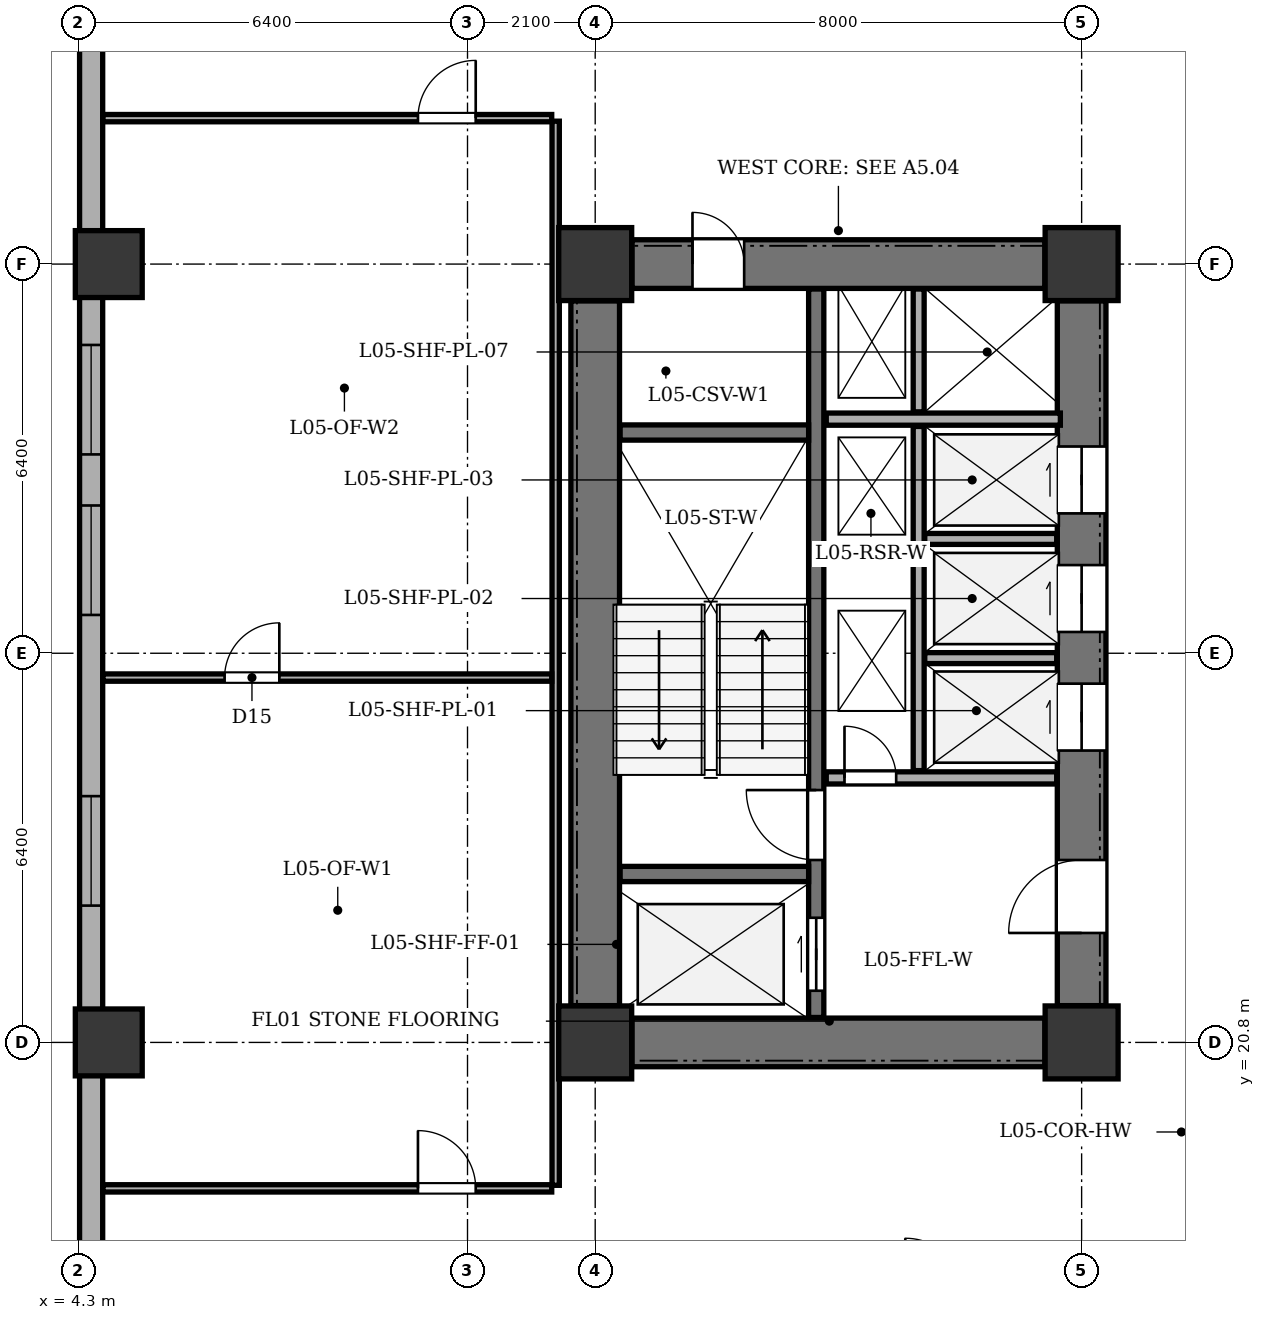
"""IFC4 building model, lengths in metres.
Left out: names, types, materials, properties, quantities, classifications, styles, units other than length and angle.
Written with IfcOpenShell. Run it as: python <this file> out.ifc"""

import sys

from ifc_helpers import new_model, si_unit, direction, frame, frame_2d, origin, origin_2d, place, context, subcontext, project, spatial, rectangle, extrude, element, fill, save


model = new_model("IFC4")
c1 = context("Model", 3, precision=1e-05, world=origin(), true_north=direction((0.0, 1.0)))
c2 = subcontext(c1, "Body", "Model", "MODEL_VIEW")
j1 = project(units=[si_unit("LENGTHUNIT", "METRE"), si_unit("PLANEANGLEUNIT", "RADIAN")], contexts=[c1])
p1 = place(None, origin())
s1 = spatial("IfcSite", under=j1, at=p1, CompositionType="ELEMENT")
p2 = place(p1, origin())
s2 = spatial("IfcBuilding", under=s1, at=p2, CompositionType="ELEMENT")
p3 = place(p2, frame((0.0, 0.0, 24.3)))
s3 = spatial("IfcBuildingStorey", under=s2, at=p3, CompositionType="ELEMENT", Elevation=24.3)
for number, where, z_axis, x_axis in (
    (1, (12.8, 20.8, 0.0), (0.0, 0.0, 1.0), (1.0, 0.0, 0.0)),
    (2, (20.8, 20.8, 0.0), (0.0, 0.0, 1.0), (1.0, 0.0, 0.0)),
    (3, (12.8, 33.6, 0.0), (0.0, 0.0, 1.0), (1.0, 0.0, 0.0)),
    (4, (20.8, 33.6, 0.0), (0.0, 0.0, 1.0), (1.0, 0.0, 0.0)),
):
    element("IfcColumn", number, at=place(p3, frame(where, z_axis=z_axis, x_axis=x_axis)), inside=s3, PredefinedType="COLUMN", context=c2, shape_type="SweptSolid", body=[
        extrude(rectangle(XDim=1.2, YDim=1.2, at=origin_2d()), origin(), (0.0, 0.0, 1.0), 3.9),
    ])
for number, where, z_axis, x_axis in (
    (5, (4.8, 20.8, 0.0), (0.0, 0.0, 1.0), (1.0, 0.0, 0.0)),
    (6, (4.8, 33.6, 0.0), (0.0, 0.0, 1.0), (1.0, 0.0, 0.0)),
):
    element("IfcColumn", number, at=place(p3, frame(where, z_axis=z_axis, x_axis=x_axis)), inside=s3, PredefinedType="COLUMN", context=c2, shape_type="SweptSolid", body=[
        extrude(rectangle(XDim=1.1, YDim=1.1, at=origin_2d()), origin(), (0.0, 0.0, 1.0), 3.9),
    ])
p4 = place(p3, frame((4.51, 6.5, 0.0), z_axis=(0.0, 0.0, 1.0), x_axis=(0.0, 1.0, 0.0)))
e7 = element("IfcWall", 7, at=p4, inside=s3, PredefinedType="STANDARD", context=c2, shape_type="SweptSolid", body=[
    extrude(rectangle(XDim=35.0, YDim=0.38, at=frame_2d((17.5, 0.0))), origin(), (0.0, 0.0, 1.0), 3.135),
])
p5 = place(p4, frame((2.693, 0.0, 0.8)))
e8 = element("IfcOpeningElement", 8, at=p5, cuts=e7, PredefinedType="OPENING", context=c2, shape_type="SweptSolid", body=[
    extrude(rectangle(XDim=1.8, YDim=1.9, at=frame_2d((0.9, 0.95))), frame((0.0, 0.2, 0.0), z_axis=(0.0, -1.0, 0.0), x_axis=(1.0, 0.0, 0.0)), (0.0, 0.0, 1.0), 0.4),
])
p6 = place(p4, frame((7.457, 0.0, 0.8)))
e9 = element("IfcOpeningElement", 9, at=p6, cuts=e7, PredefinedType="OPENING", context=c2, shape_type="SweptSolid", body=[
    extrude(rectangle(XDim=2.4, YDim=1.9, at=frame_2d((1.2, 0.95))), frame((0.0, 0.2, 0.0), z_axis=(0.0, -1.0, 0.0), x_axis=(1.0, 0.0, 0.0)), (0.0, 0.0, 1.0), 0.4),
])
p7 = place(p4, frame((16.55, 0.0, 0.8)))
e10 = element("IfcOpeningElement", 10, at=p7, cuts=e7, PredefinedType="OPENING", context=c2, shape_type="SweptSolid", body=[
    extrude(rectangle(XDim=1.8, YDim=1.9, at=frame_2d((0.9, 0.95))), frame((0.0, 0.2, 0.0), z_axis=(0.0, -1.0, 0.0), x_axis=(1.0, 0.0, 0.0)), (0.0, 0.0, 1.0), 0.4),
])
p8 = place(p4, frame((21.33, 0.0, 0.8)))
e11 = element("IfcOpeningElement", 11, at=p8, cuts=e7, PredefinedType="OPENING", context=c2, shape_type="SweptSolid", body=[
    extrude(rectangle(XDim=1.8, YDim=1.9, at=frame_2d((0.9, 0.95))), frame((0.0, 0.2, 0.0), z_axis=(0.0, -1.0, 0.0), x_axis=(1.0, 0.0, 0.0)), (0.0, 0.0, 1.0), 0.4),
])
p9 = place(p4, frame((23.97, 0.0, 0.8)))
e12 = element("IfcOpeningElement", 12, at=p9, cuts=e7, PredefinedType="OPENING", context=c2, shape_type="SweptSolid", body=[
    extrude(rectangle(XDim=1.8, YDim=1.9, at=frame_2d((0.9, 0.95))), frame((0.0, 0.2, 0.0), z_axis=(0.0, -1.0, 0.0), x_axis=(1.0, 0.0, 0.0)), (0.0, 0.0, 1.0), 0.4),
])
p10 = place(p4, frame((31.175, 0.0, 0.8)))
e13 = element("IfcOpeningElement", 13, at=p10, cuts=e7, PredefinedType="OPENING", context=c2, shape_type="SweptSolid", body=[
    extrude(rectangle(XDim=1.8, YDim=1.9, at=frame_2d((0.9, 0.95))), frame((0.0, 0.2, 0.0), z_axis=(0.0, -1.0, 0.0), x_axis=(1.0, 0.0, 0.0)), (0.0, 0.0, 1.0), 0.4),
])
p11 = place(p3, frame((12.8, 21.405, 0.0), z_axis=(0.0, 0.0, 1.0), x_axis=(0.0, 1.0, 0.0)))
e14 = element("IfcWall", 14, at=p11, inside=s3, PredefinedType="SHEAR", context=c2, shape_type="SweptSolid", body=[
    extrude(rectangle(XDim=11.59, YDim=0.8, at=frame_2d((5.795, 0.0))), origin(), (0.0, 0.0, 1.0), 3.6),
])
p12 = place(p3, frame((13.405, 20.8, 0.0), z_axis=(0.0, 0.0, 1.0), x_axis=(1.0, 0.0, 0.0)))
e15 = element("IfcWall", 15, at=p12, inside=s3, PredefinedType="SHEAR", context=c2, shape_type="SweptSolid", body=[
    extrude(rectangle(XDim=6.79, YDim=0.8, at=frame_2d((3.395, 0.0))), origin(), (0.0, 0.0, 1.0), 3.6),
])
p13 = place(p3, frame((13.405, 33.6, 0.0), z_axis=(0.0, 0.0, 1.0), x_axis=(1.0, 0.0, 0.0)))
e16 = element("IfcWall", 16, at=p13, inside=s3, PredefinedType="SHEAR", context=c2, shape_type="SweptSolid", body=[
    extrude(rectangle(XDim=6.79, YDim=0.8, at=frame_2d((3.395, 0.0))), origin(), (0.0, 0.0, 1.0), 3.6),
])
p14 = place(p13, frame((0.995, 0.0, 0.0)))
e17 = element("IfcOpeningElement", 17, at=p14, cuts=e16, PredefinedType="OPENING", context=c2, shape_type="SweptSolid", body=[
    extrude(rectangle(XDim=0.85, YDim=2.02, at=frame_2d((0.425, 1.01))), frame((0.0, 0.41, 0.0), z_axis=(0.0, -1.0, 0.0), x_axis=(1.0, 0.0, 0.0)), (0.0, 0.0, 1.0), 0.82),
])
p15 = place(p3, frame((20.8, 21.405, 0.0), z_axis=(0.0, 0.0, 1.0), x_axis=(0.0, 1.0, 0.0)))
e18 = element("IfcWall", 18, at=p15, inside=s3, PredefinedType="SHEAR", context=c2, shape_type="SweptSolid", body=[
    extrude(rectangle(XDim=11.59, YDim=0.8, at=frame_2d((5.795, 0.0))), origin(), (0.0, 0.0, 1.0), 3.6),
])
p16 = place(p15, frame((1.195, 0.0, 0.0)))
e19 = element("IfcOpeningElement", 19, at=p16, cuts=e18, PredefinedType="OPENING", context=c2, shape_type="SweptSolid", body=[
    extrude(rectangle(XDim=1.2, YDim=2.15, at=frame_2d((0.6, 1.075))), frame((0.0, 0.41, 0.0), z_axis=(0.0, -1.0, 0.0), x_axis=(1.0, 0.0, 0.0)), (0.0, 0.0, 1.0), 0.82),
])
p17 = place(p15, frame((4.195, 0.0, 0.0)))
e20 = element("IfcOpeningElement", 20, at=p17, cuts=e18, PredefinedType="OPENING", context=c2, shape_type="SweptSolid", body=[
    extrude(rectangle(XDim=1.1, YDim=2.1, at=frame_2d((0.55, 1.05))), frame((0.0, 0.41, 0.0), z_axis=(0.0, -1.0, 0.0), x_axis=(1.0, 0.0, 0.0)), (0.0, 0.0, 1.0), 0.82),
])
p18 = place(p15, frame((6.145, 0.0, 0.0)))
e21 = element("IfcOpeningElement", 21, at=p18, cuts=e18, PredefinedType="OPENING", context=c2, shape_type="SweptSolid", body=[
    extrude(rectangle(XDim=1.1, YDim=2.1, at=frame_2d((0.55, 1.05))), frame((0.0, 0.41, 0.0), z_axis=(0.0, -1.0, 0.0), x_axis=(1.0, 0.0, 0.0)), (0.0, 0.0, 1.0), 0.82),
])
p19 = place(p15, frame((8.095, 0.0, 0.0)))
e22 = element("IfcOpeningElement", 22, at=p19, cuts=e18, PredefinedType="OPENING", context=c2, shape_type="SweptSolid", body=[
    extrude(rectangle(XDim=1.1, YDim=2.1, at=frame_2d((0.55, 1.05))), frame((0.0, 0.41, 0.0), z_axis=(0.0, -1.0, 0.0), x_axis=(1.0, 0.0, 0.0)), (0.0, 0.0, 1.0), 0.82),
])
p20 = place(p3, frame((16.435, 21.21, 0.0), z_axis=(0.0, 0.0, 1.0), x_axis=(0.0, 1.0, 0.0)))
e23 = element("IfcWall", 23, at=p20, inside=s3, PredefinedType="SHEAR", context=c2, shape_type="SweptSolid", body=[
    extrude(rectangle(XDim=11.98, YDim=0.25, at=frame_2d((5.99, 0.0))), origin(), (0.0, 0.0, 1.0), 3.6),
])
p21 = place(p20, frame((0.44, 0.0, 0.0)))
e24 = element("IfcOpeningElement", 24, at=p21, cuts=e23, PredefinedType="OPENING", context=c2, shape_type="SweptSolid", body=[
    extrude(rectangle(XDim=1.2, YDim=2.15, at=frame_2d((0.6, 1.075))), frame((0.0, 0.135, 0.0), z_axis=(0.0, -1.0, 0.0), x_axis=(1.0, 0.0, 0.0)), (0.0, 0.0, 1.0), 0.27),
])
p22 = place(p20, frame((2.59, 0.0, 0.0)))
e25 = element("IfcOpeningElement", 25, at=p22, cuts=e23, PredefinedType="OPENING", context=c2, shape_type="SweptSolid", body=[
    extrude(rectangle(XDim=1.15, YDim=2.15, at=frame_2d((0.575, 1.075))), frame((0.0, 0.135, 0.0), z_axis=(0.0, -1.0, 0.0), x_axis=(1.0, 0.0, 0.0)), (0.0, 0.0, 1.0), 0.27),
])
for number, where, z_axis, x_axis in (
    (26, (13.21, 23.57, 0.0), (0.0, 0.0, 1.0), (1.0, 0.0, 0.0)),
    (27, (13.21, 30.83, 0.0), (0.0, 0.0, 1.0), (1.0, 0.0, 0.0)),
):
    element("IfcWall", number, at=place(p3, frame(where, z_axis=z_axis, x_axis=x_axis)), inside=s3, PredefinedType="SHEAR", context=c2, shape_type="SweptSolid", body=[
        extrude(rectangle(XDim=3.1, YDim=0.25, at=frame_2d((1.55, 0.0))), origin(), (0.0, 0.0, 1.0), 3.6),
    ])
p23 = place(p3, frame((16.6, 25.15, 0.0), z_axis=(0.0, 0.0, 1.0), x_axis=(1.0, 0.0, 0.0)))
e28 = element("IfcWall", 28, at=p23, inside=s3, PredefinedType="SOLIDWALL", context=c2, shape_type="SweptSolid", body=[
    extrude(rectangle(XDim=3.79, YDim=0.2, at=frame_2d((1.895, 0.0))), origin(), (0.0, 0.0, 1.0), 3.6),
])
p24 = place(p23, frame((0.3, 0.0, 0.0)))
e29 = element("IfcOpeningElement", 29, at=p24, cuts=e28, PredefinedType="OPENING", context=c2, shape_type="SweptSolid", body=[
    extrude(rectangle(XDim=0.85, YDim=2.02, at=frame_2d((0.425, 1.01))), frame((0.0, 0.11, 0.0), z_axis=(0.0, -1.0, 0.0), x_axis=(1.0, 0.0, 0.0)), (0.0, 0.0, 1.0), 0.22),
])
p25 = place(p3, frame((16.6, 31.05, 0.0), z_axis=(0.0, 0.0, 1.0), x_axis=(1.0, 0.0, 0.0)))
e30 = element("IfcWall", 30, at=p25, inside=s3, PredefinedType="SOLIDWALL", context=c2, shape_type="SweptSolid", body=[
    extrude(rectangle(XDim=3.85, YDim=0.2, at=frame_2d((1.925, 0.0))), origin(), (0.0, 0.0, 1.0), 3.6),
])
p26 = place(p3, frame((18.12, 25.27, 0.0), z_axis=(0.0, 0.0, 1.0), x_axis=(0.0, 1.0, 0.0)))
e31 = element("IfcWall", 31, at=p26, inside=s3, PredefinedType="PARTITIONING", context=c2, shape_type="SweptSolid", body=[
    extrude(rectangle(XDim=5.66, YDim=0.18, at=frame_2d((2.83, 0.0))), origin(), (0.0, 0.0, 1.0), 3.6),
])
p27 = place(p3, frame((18.12, 31.17, 0.0), z_axis=(0.0, 0.0, 1.0), x_axis=(0.0, 1.0, 0.0)))
e32 = element("IfcWall", 32, at=p27, inside=s3, PredefinedType="PARTITIONING", context=c2, shape_type="SweptSolid", body=[
    extrude(rectangle(XDim=2.02, YDim=0.18, at=frame_2d((1.01, 0.0))), origin(), (0.0, 0.0, 1.0), 3.6),
])
for number, where, z_axis, x_axis in (
    (33, (18.22, 27.12, 0.0), (0.0, 0.0, 1.0), (1.0, 0.0, 0.0)),
    (34, (18.22, 29.08, 0.0), (0.0, 0.0, 1.0), (1.0, 0.0, 0.0)),
):
    element("IfcWall", number, at=place(p3, frame(where, z_axis=z_axis, x_axis=x_axis)), inside=s3, PredefinedType="PARTITIONING", context=c2, shape_type="SweptSolid", body=[
        extrude(rectangle(XDim=2.17, YDim=0.18, at=frame_2d((1.085, 0.0))), origin(), (0.0, 0.0, 1.0), 3.6),
    ])
p28 = place(p3, frame((12.15, 18.45, 0.0), z_axis=(0.0, 0.0, 1.0), x_axis=(0.0, 1.0, 0.0)))
e35 = element("IfcWall", 35, at=p28, inside=s3, PredefinedType="PARTITIONING", context=c2, shape_type="SweptSolid", body=[
    extrude(rectangle(XDim=17.5, YDim=0.12, at=frame_2d((8.75, 0.0))), origin(), (0.0, 0.0, 1.0), 3.6),
])
p29 = place(p3, frame((4.705, 18.4, 0.0), z_axis=(0.0, 0.0, 1.0), x_axis=(1.0, 0.0, 0.0)))
e36 = element("IfcWall", 36, at=p29, inside=s3, PredefinedType="PARTITIONING", context=c2, shape_type="SweptSolid", body=[
    extrude(rectangle(XDim=7.38, YDim=0.12, at=frame_2d((3.69, 0.0))), origin(), (0.0, 0.0, 1.0), 3.6),
])
p30 = place(p29, frame((5.18, 0.0, 0.0)))
e37 = element("IfcOpeningElement", 37, at=p30, cuts=e36, PredefinedType="OPENING", context=c2, shape_type="SweptSolid", body=[
    extrude(rectangle(XDim=0.95, YDim=2.1, at=frame_2d((0.475, 1.05))), frame((0.0, 0.07, 0.0), z_axis=(0.0, -1.0, 0.0), x_axis=(1.0, 0.0, 0.0)), (0.0, 0.0, 1.0), 0.14),
])
p31 = place(p3, frame((4.705, 36.0, 0.0), z_axis=(0.0, 0.0, 1.0), x_axis=(1.0, 0.0, 0.0)))
e38 = element("IfcWall", 38, at=p31, inside=s3, PredefinedType="PARTITIONING", context=c2, shape_type="SweptSolid", body=[
    extrude(rectangle(XDim=7.38, YDim=0.12, at=frame_2d((3.69, 0.0))), origin(), (0.0, 0.0, 1.0), 3.6),
])
p32 = place(p31, frame((5.18, 0.0, 0.0)))
e39 = element("IfcOpeningElement", 39, at=p32, cuts=e38, PredefinedType="OPENING", context=c2, shape_type="SweptSolid", body=[
    extrude(rectangle(XDim=0.95, YDim=2.1, at=frame_2d((0.475, 1.05))), frame((0.0, 0.07, 0.0), z_axis=(0.0, -1.0, 0.0), x_axis=(1.0, 0.0, 0.0)), (0.0, 0.0, 1.0), 0.14),
])
p33 = place(p3, frame((4.705, 26.8, 0.0), z_axis=(0.0, 0.0, 1.0), x_axis=(1.0, 0.0, 0.0)))
e40 = element("IfcWall", 40, at=p33, inside=s3, PredefinedType="PARTITIONING", context=c2, shape_type="SweptSolid", body=[
    extrude(rectangle(XDim=7.38, YDim=0.12, at=frame_2d((3.69, 0.0))), origin(), (0.0, 0.0, 1.0), 3.6),
])
p34 = place(p33, frame((2.0, 0.0, 0.0)))
e41 = element("IfcOpeningElement", 41, at=p34, cuts=e40, PredefinedType="OPENING", context=c2, shape_type="SweptSolid", body=[
    extrude(rectangle(XDim=0.9, YDim=2.05, at=frame_2d((0.45, 1.025))), frame((0.0, 0.07, 0.0), z_axis=(0.0, -1.0, 0.0), x_axis=(1.0, 0.0, 0.0)), (0.0, 0.0, 1.0), 0.14),
])
p35 = place(p7, origin())
e42 = element("IfcWindow", 42, at=p35, inside=s3, PartitioningType="SINGLE_PANEL", PredefinedType="WINDOW", context=c2, shape_type="SweptSolid", body=[
    extrude(rectangle(XDim=1.8, YDim=1.9, at=frame_2d((0.9, 0.95))), frame((0.0, -0.01, 0.0), z_axis=(0.0, -1.0, 0.0), x_axis=(1.0, 0.0, 0.0)), (0.0, 0.0, 1.0), 0.06),
])
fill(e10, e42)
p36 = place(p8, origin())
e43 = element("IfcWindow", 43, at=p36, inside=s3, PartitioningType="SINGLE_PANEL", PredefinedType="WINDOW", context=c2, shape_type="SweptSolid", body=[
    extrude(rectangle(XDim=1.8, YDim=1.9, at=frame_2d((0.9, 0.95))), frame((0.0, -0.01, 0.0), z_axis=(0.0, -1.0, 0.0), x_axis=(1.0, 0.0, 0.0)), (0.0, 0.0, 1.0), 0.06),
])
fill(e11, e43)
p37 = place(p9, origin())
e44 = element("IfcWindow", 44, at=p37, inside=s3, PartitioningType="SINGLE_PANEL", PredefinedType="WINDOW", context=c2, shape_type="SweptSolid", body=[
    extrude(rectangle(XDim=1.8, YDim=1.9, at=frame_2d((0.9, 0.95))), frame((0.0, -0.01, 0.0), z_axis=(0.0, -1.0, 0.0), x_axis=(1.0, 0.0, 0.0)), (0.0, 0.0, 1.0), 0.06),
])
fill(e12, e44)
p38 = place(p14, origin())
e45 = element("IfcDoor", 45, at=p38, inside=s3, OperationType="SINGLE_SWING_LEFT", PredefinedType="DOOR", context=c2, shape_type="SweptSolid", body=[
    extrude(rectangle(XDim=0.85, YDim=2.02, at=frame_2d((0.425, 1.01))), frame((0.0, 0.025, 0.0), z_axis=(0.0, -1.0, 0.0), x_axis=(1.0, 0.0, 0.0)), (0.0, 0.0, 1.0), 0.05),
])
fill(e17, e45)
p39 = place(p16, origin())
e46 = element("IfcDoor", 46, at=p39, inside=s3, OperationType="SINGLE_SWING_LEFT", PredefinedType="DOOR", context=c2, shape_type="SweptSolid", body=[
    extrude(rectangle(XDim=1.2, YDim=2.15, at=frame_2d((0.6, 1.075))), frame((0.0, 0.025, 0.0), z_axis=(0.0, -1.0, 0.0), x_axis=(1.0, 0.0, 0.0)), (0.0, 0.0, 1.0), 0.05),
])
fill(e19, e46)
p40 = place(p17, origin())
e47 = element("IfcDoor", 47, at=p40, inside=s3, OperationType="DOUBLE_DOOR_SLIDING", PredefinedType="DOOR", context=c2, shape_type="SweptSolid", body=[
    extrude(rectangle(XDim=1.1, YDim=2.1, at=frame_2d((0.55, 1.05))), frame((0.0, 0.025, 0.0), z_axis=(0.0, -1.0, 0.0), x_axis=(1.0, 0.0, 0.0)), (0.0, 0.0, 1.0), 0.05),
])
fill(e20, e47)
p41 = place(p18, origin())
e48 = element("IfcDoor", 48, at=p41, inside=s3, OperationType="DOUBLE_DOOR_SLIDING", PredefinedType="DOOR", context=c2, shape_type="SweptSolid", body=[
    extrude(rectangle(XDim=1.1, YDim=2.1, at=frame_2d((0.55, 1.05))), frame((0.0, 0.025, 0.0), z_axis=(0.0, -1.0, 0.0), x_axis=(1.0, 0.0, 0.0)), (0.0, 0.0, 1.0), 0.05),
])
fill(e21, e48)
p42 = place(p19, origin())
e49 = element("IfcDoor", 49, at=p42, inside=s3, OperationType="DOUBLE_DOOR_SLIDING", PredefinedType="DOOR", context=c2, shape_type="SweptSolid", body=[
    extrude(rectangle(XDim=1.1, YDim=2.1, at=frame_2d((0.55, 1.05))), frame((0.0, 0.025, 0.0), z_axis=(0.0, -1.0, 0.0), x_axis=(1.0, 0.0, 0.0)), (0.0, 0.0, 1.0), 0.05),
])
fill(e22, e49)
p43 = place(p21, origin())
e50 = element("IfcDoor", 50, at=p43, inside=s3, OperationType="DOUBLE_DOOR_SLIDING", PredefinedType="DOOR", context=c2, shape_type="SweptSolid", body=[
    extrude(rectangle(XDim=1.2, YDim=2.15, at=frame_2d((0.6, 1.075))), frame((0.0, 0.025, 0.0), z_axis=(0.0, -1.0, 0.0), x_axis=(1.0, 0.0, 0.0)), (0.0, 0.0, 1.0), 0.05),
])
fill(e24, e50)
p44 = place(p22, origin())
e51 = element("IfcDoor", 51, at=p44, inside=s3, OperationType="SINGLE_SWING_RIGHT", PredefinedType="DOOR", context=c2, shape_type="SweptSolid", body=[
    extrude(rectangle(XDim=1.15, YDim=2.15, at=frame_2d((0.575, 1.075))), frame((0.0, 0.025, 0.0), z_axis=(0.0, -1.0, 0.0), x_axis=(1.0, 0.0, 0.0)), (0.0, 0.0, 1.0), 0.05),
])
fill(e25, e51)
p45 = place(p24, origin())
e52 = element("IfcDoor", 52, at=p45, inside=s3, OperationType="SINGLE_SWING_LEFT", PredefinedType="DOOR", context=c2, shape_type="SweptSolid", body=[
    extrude(rectangle(XDim=0.85, YDim=2.02, at=frame_2d((0.425, 1.01))), frame((0.0, 0.025, 0.0), z_axis=(0.0, -1.0, 0.0), x_axis=(1.0, 0.0, 0.0)), (0.0, 0.0, 1.0), 0.05),
])
fill(e29, e52)
p46 = place(p34, origin())
e53 = element("IfcDoor", 53, at=p46, inside=s3, OperationType="SINGLE_SWING_RIGHT", PredefinedType="DOOR", context=c2, shape_type="SweptSolid", body=[
    extrude(rectangle(XDim=0.9, YDim=2.05, at=frame_2d((0.45, 1.025))), frame((0.0, 0.025, 0.0), z_axis=(0.0, -1.0, 0.0), x_axis=(1.0, 0.0, 0.0)), (0.0, 0.0, 1.0), 0.05),
])
fill(e41, e53)
p47 = place(p30, origin())
e54 = element("IfcDoor", 54, at=p47, inside=s3, OperationType="SINGLE_SWING_LEFT", PredefinedType="DOOR", context=c2, shape_type="SweptSolid", body=[
    extrude(rectangle(XDim=0.95, YDim=2.1, at=frame_2d((0.475, 1.05))), frame((0.0, 0.025, 0.0), z_axis=(0.0, -1.0, 0.0), x_axis=(1.0, 0.0, 0.0)), (0.0, 0.0, 1.0), 0.05),
])
fill(e37, e54)
p48 = place(p32, origin())
e55 = element("IfcDoor", 55, at=p48, inside=s3, OperationType="SINGLE_SWING_RIGHT", PredefinedType="DOOR", context=c2, shape_type="SweptSolid", body=[
    extrude(rectangle(XDim=0.95, YDim=2.1, at=frame_2d((0.475, 1.05))), frame((0.0, 0.025, 0.0), z_axis=(0.0, -1.0, 0.0), x_axis=(1.0, 0.0, 0.0)), (0.0, 0.0, 1.0), 0.05),
])
fill(e39, e55)
save(model, sys.argv[1])
